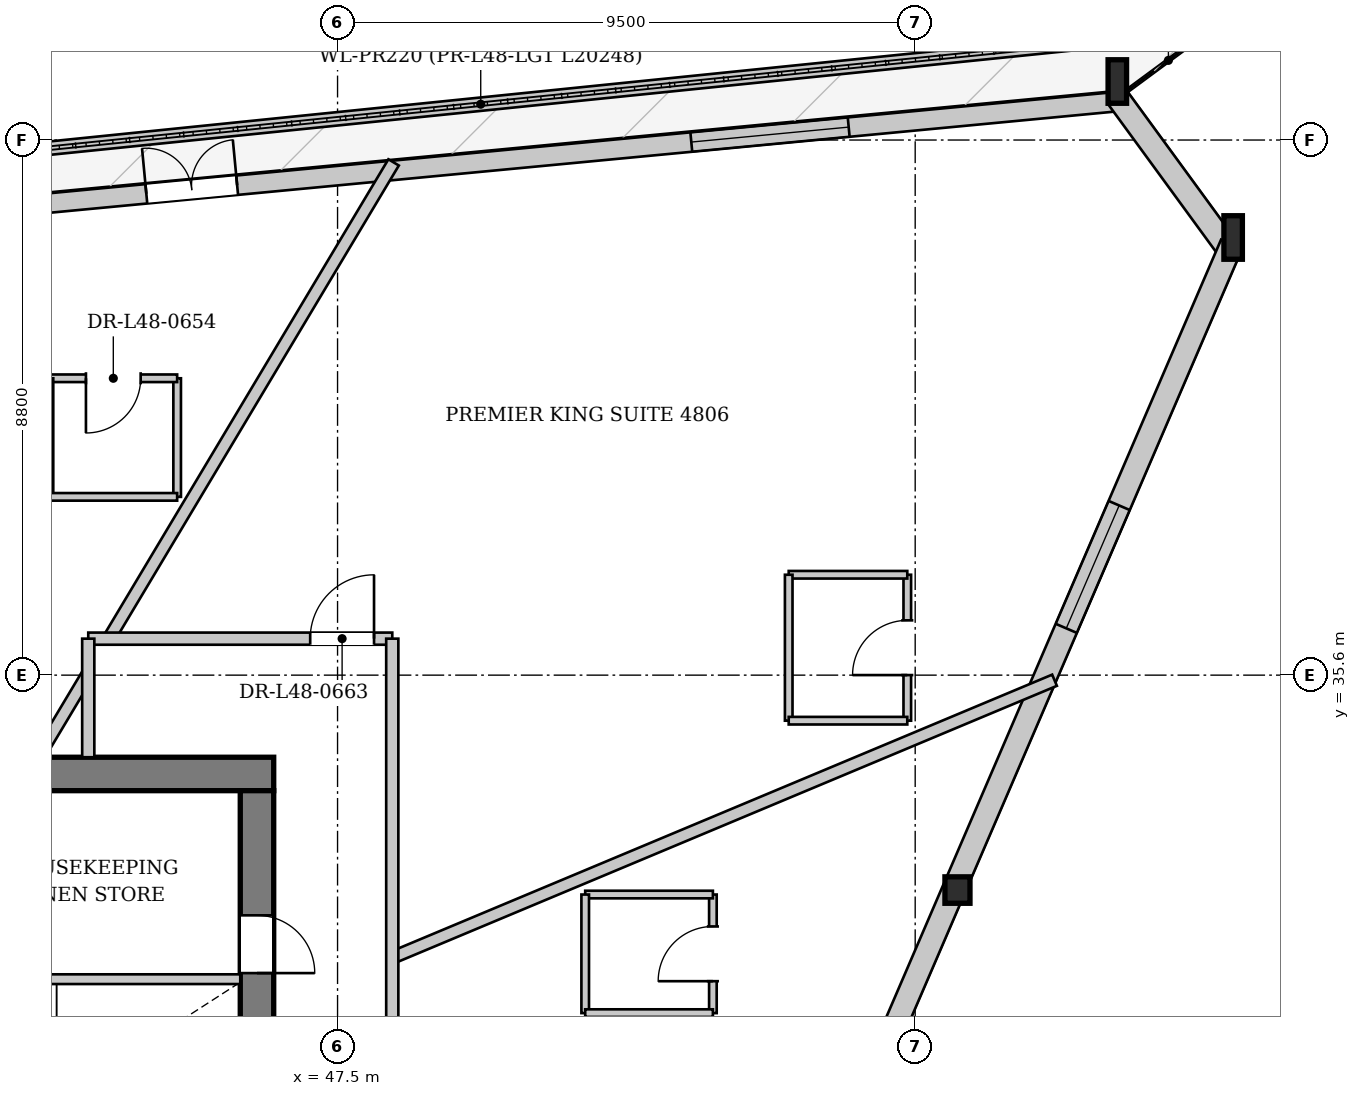
"""IFC4 building model, lengths in metres.
Left out: names, types, materials, properties, quantities, classifications, styles, units other than length and angle.
Written with IfcOpenShell. Run it as: python <this file> out.ifc"""

import sys

from ifc_helpers import new_model, si_unit, direction, frame, frame_2d, origin, origin_2d, place, context, subcontext, project, spatial, rectangle, i_section, extrude, source, transform, mapped, element, fill, save


model = new_model("IFC4")
c1 = context("Model", 3, precision=1e-05, world=origin(), true_north=direction((0.0, 1.0)))
c2 = subcontext(c1, "Body", "Model", "MODEL_VIEW")
j1 = project(units=[si_unit("LENGTHUNIT", "METRE"), si_unit("PLANEANGLEUNIT", "RADIAN")], contexts=[c1])
p1 = place(None, origin())
s1 = spatial("IfcSite", under=j1, at=p1, CompositionType="ELEMENT")
p2 = place(p1, origin())
s2 = spatial("IfcBuilding", under=s1, at=p2, CompositionType="ELEMENT")
p3 = place(p2, frame((0.0, 0.0, 182.1)))
s3 = spatial("IfcBuildingStorey", under=s2, at=p3, CompositionType="ELEMENT", Elevation=182.1)
m1 = source(origin(), c2, "Body", "SweptSolid", [
    extrude(i_section(OverallWidth=0.304, OverallDepth=0.716, WebThickness=0.021, FlangeThickness=0.04, at=origin_2d()), origin(), (0.0, 0.0, 1.0), 3.418),
])
p4 = place(p3, frame((62.38, 42.613, 0.0), z_axis=(-0.08806071749, 0.108058285128, 0.990236697487), x_axis=(-0.775188521165, -0.631729971313, 0.0)))
e1 = element("IfcColumn", 1, at=p4, inside=s3, PredefinedType="COLUMN", context=c2, shape_type="MappedRepresentation", body=[
    mapped(m1, transform((0.0, 0.0, 0.0), x_axis=(1.0, 0.0, 0.0), y_axis=(0.0, 1.0, 0.0), z_axis=(0.0, 0.0, 1.0), scale=1.0)),
])
m2 = source(origin(), c2, "Body", "SweptSolid", [
    extrude(i_section(OverallWidth=0.304, OverallDepth=0.716, WebThickness=0.021, FlangeThickness=0.04, at=origin_2d()), origin(), (0.0, 0.0, 1.0), 3.414),
])
p5 = place(p3, frame((60.484, 45.208, 0.0), z_axis=(-0.093253223651, 0.090392695318, 0.99153063337), x_axis=(-0.696008228581, -0.718033805435, 0.0)))
e2 = element("IfcColumn", 2, at=p5, inside=s3, PredefinedType="COLUMN", context=c2, shape_type="MappedRepresentation", body=[
    mapped(m2, transform((0.0, 0.0, 0.0), x_axis=(1.0, 0.0, 0.0), y_axis=(0.0, 1.0, 0.0), z_axis=(0.0, 0.0, 1.0), scale=1.0)),
])
m3 = source(origin(), c2, "Body", "SweptSolid", [
    extrude(i_section(OverallWidth=0.412, OverallDepth=0.435, WebThickness=0.031, FlangeThickness=0.05, at=origin_2d()), origin(), (0.0, 0.0, 1.0), 3.404),
])
p6 = place(p3, frame((57.769, 31.905, 0.0), z_axis=(-0.043541791354, 0.094472058012, 0.994574855232), x_axis=(-0.908181269279, -0.418577092219, 0.0)))
e3 = element("IfcColumn", 3, at=p6, inside=s3, PredefinedType="COLUMN", context=c2, shape_type="MappedRepresentation", body=[
    mapped(m3, transform((0.0, 0.0, 0.0), x_axis=(1.0, 0.0, 0.0), y_axis=(0.0, 1.0, 0.0), z_axis=(0.0, 0.0, 1.0), scale=1.0)),
])
p7 = place(p3, frame((37.857, 42.898, 0.0), z_axis=(0.0, 0.0, 1.0), x_axis=(0.995520332202, 0.094547703155, 0.0)))
e4 = element("IfcWall", 4, at=p7, inside=s3, PredefinedType="SOLIDWALL", context=c2, shape_type="SweptSolid", body=[
    extrude(rectangle(XDim=22.744, YDim=0.32, at=frame_2d((11.372, 0.0))), origin(), (0.0, 0.0, 1.0), 2.722),
])
p8 = place(p7, frame((6.528, 0.0, 0.0)))
e5 = element("IfcOpeningElement", 5, at=p8, cuts=e4, PredefinedType="OPENING", context=c2, shape_type="SweptSolid", body=[
    extrude(rectangle(XDim=1.5, YDim=2.3, at=frame_2d((0.75, 1.15))), frame((0.0, 0.17, 0.0), z_axis=(0.0, -1.0, 0.0), x_axis=(1.0, 0.0, 0.0)), (0.0, 0.0, 1.0), 0.34),
])
p9 = place(p7, frame((15.531, 0.0, 0.252)))
e6 = element("IfcOpeningElement", 6, at=p9, cuts=e4, PredefinedType="OPENING", context=c2, shape_type="SweptSolid", body=[
    extrude(rectangle(XDim=2.6, YDim=2.35, at=frame_2d((1.3, 1.175))), frame((0.0, 0.17, 0.0), z_axis=(0.0, -1.0, 0.0), x_axis=(1.0, 0.0, 0.0)), (0.0, 0.0, 1.0), 0.34),
])
p10 = place(p3, frame((60.33, 45.096, 0.0), z_axis=(0.0, 0.0, 1.0), x_axis=(0.589877559106, -0.807492702917, 0.0)))
e7 = element("IfcWall", 7, at=p10, inside=s3, PredefinedType="SOLIDWALL", context=c2, shape_type="SweptSolid", body=[
    extrude(rectangle(XDim=3.214, YDim=0.38, at=frame_2d((1.607, 0.0))), origin(), (0.0, 0.0, 1.0), 2.722),
])
p11 = place(p3, frame((62.205, 42.688, 0.0), z_axis=(0.0, 0.0, 1.0), x_axis=(-0.395471845497, -0.918478099586, 0.0)))
e8 = element("IfcWall", 8, at=p11, inside=s3, PredefinedType="SOLIDWALL", context=c2, shape_type="SweptSolid", body=[
    extrude(rectangle(XDim=23.316, YDim=0.38, at=frame_2d((11.658, 0.0))), origin(), (0.0, 0.0, 1.0), 2.722),
])
p12 = place(p11, frame((4.679, 0.0, 0.352)))
e9 = element("IfcOpeningElement", 9, at=p12, cuts=e8, PredefinedType="OPENING", context=c2, shape_type="SweptSolid", body=[
    extrude(rectangle(XDim=2.2, YDim=2.25, at=frame_2d((1.1, 1.125))), frame((0.0, 0.2, 0.0), z_axis=(0.0, -1.0, 0.0), x_axis=(1.0, 0.0, 0.0)), (0.0, 0.0, 1.0), 0.4),
])
p13 = place(p11, frame((15.688, 0.0, 0.352)))
e10 = element("IfcOpeningElement", 10, at=p13, cuts=e8, PredefinedType="OPENING", context=c2, shape_type="SweptSolid", body=[
    extrude(rectangle(XDim=2.2, YDim=2.25, at=frame_2d((1.1, 1.125))), frame((0.0, 0.2, 0.0), z_axis=(0.0, -1.0, 0.0), x_axis=(1.0, 0.0, 0.0)), (0.0, 0.0, 1.0), 0.4),
])
p14 = place(p3, frame((59.927, 46.017, 0.0), z_axis=(0.0, 0.0, 1.0), x_axis=(-0.994838142645, -0.101474479251, 0.0)))
e11 = element("IfcWall", 11, at=p14, inside=s3, PredefinedType="PARAPET", context=c2, shape_type="SweptSolid", body=[
    extrude(rectangle(XDim=20.248, YDim=0.22, at=frame_2d((10.124, 0.0))), origin(), (0.0, 0.0, 1.0), 0.3),
])
p15 = place(p3, frame((29.55, 33.975, 0.0), z_axis=(0.0, 0.0, 1.0), x_axis=(1.0, 0.0, 0.0)))
e12 = element("IfcWall", 12, at=p15, inside=s3, PredefinedType="SHEAR", context=c2, shape_type="SweptSolid", body=[
    extrude(rectangle(XDim=16.9, YDim=0.55, at=frame_2d((8.45, 0.0))), origin(), (0.0, 0.0, 1.0), 3.33),
])
p16 = place(p15, frame((1.55, 0.0, 0.0)))
e13 = element("IfcOpeningElement", 13, at=p16, cuts=e12, PredefinedType="OPENING", context=c2, shape_type="SweptSolid", body=[
    extrude(rectangle(XDim=0.95, YDim=2.1, at=frame_2d((0.475, 1.05))), frame((0.0, 0.285, 0.0), z_axis=(0.0, -1.0, 0.0), x_axis=(1.0, 0.0, 0.0)), (0.0, 0.0, 1.0), 0.57),
])
p17 = place(p15, frame((3.93, 0.0, 0.0)))
e14 = element("IfcOpeningElement", 14, at=p17, cuts=e12, PredefinedType="OPENING", context=c2, shape_type="SweptSolid", body=[
    extrude(rectangle(XDim=1.32, YDim=2.2, at=frame_2d((0.66, 1.1))), frame((0.0, 0.285, 0.0), z_axis=(0.0, -1.0, 0.0), x_axis=(1.0, 0.0, 0.0)), (0.0, 0.0, 1.0), 0.57),
])
p18 = place(p3, frame((46.175, 33.7, 0.0), z_axis=(0.0, 0.0, 1.0), x_axis=(0.0, -1.0, 0.0)))
e15 = element("IfcWall", 15, at=p18, inside=s3, PredefinedType="SHEAR", context=c2, shape_type="SweptSolid", body=[
    extrude(rectangle(XDim=14.2, YDim=0.55, at=frame_2d((7.1, 0.0))), origin(), (0.0, 0.0, 1.0), 3.33),
])
p19 = place(p18, frame((5.18, 0.0, 0.0)))
e16 = element("IfcOpeningElement", 16, at=p19, cuts=e15, PredefinedType="OPENING", context=c2, shape_type="SweptSolid", body=[
    extrude(rectangle(XDim=1.6, YDim=2.2, at=frame_2d((0.8, 1.1))), frame((0.0, 0.285, 0.0), z_axis=(0.0, -1.0, 0.0), x_axis=(1.0, 0.0, 0.0)), (0.0, 0.0, 1.0), 0.57),
])
p20 = place(p18, frame((2.05, 0.0, 0.0)))
e17 = element("IfcOpeningElement", 17, at=p20, cuts=e15, PredefinedType="OPENING", context=c2, shape_type="SweptSolid", body=[
    extrude(rectangle(XDim=0.95, YDim=2.1, at=frame_2d((0.475, 1.05))), frame((0.0, 0.285, 0.0), z_axis=(0.0, -1.0, 0.0), x_axis=(1.0, 0.0, 0.0)), (0.0, 0.0, 1.0), 0.57),
])
p21 = place(p3, frame((40.72, 30.6, 0.0), z_axis=(0.0, 0.0, 1.0), x_axis=(1.0, 0.0, 0.0)))
e18 = element("IfcWall", 18, at=p21, inside=s3, PredefinedType="PARTITIONING", context=c2, shape_type="SweptSolid", body=[
    extrude(rectangle(XDim=5.18, YDim=0.16, at=frame_2d((2.59, 0.0))), origin(), (0.0, 0.0, 1.0), 3.33),
])
p22 = place(p3, frame((48.4, 30.955, 0.0), z_axis=(0.0, 0.0, 1.0), x_axis=(0.922383605096, 0.386275141641, 0.0)))
e19 = element("IfcWall", 19, at=p22, inside=s3, PredefinedType="PARTITIONING", context=c2, shape_type="SweptSolid", body=[
    extrude(rectangle(XDim=11.808, YDim=0.2, at=frame_2d((5.904, 0.0))), origin(), (0.0, 0.0, 1.0), 3.33),
])
p23 = place(p3, frame((42.573, 34.25, 0.0), z_axis=(0.0, 0.0, 1.0), x_axis=(0.513135248782, 0.858307763251, 0.0)))
e20 = element("IfcWall", 20, at=p23, inside=s3, PredefinedType="PARTITIONING", context=c2, shape_type="SweptSolid", body=[
    extrude(rectangle(XDim=1.611, YDim=0.2, at=frame_2d((0.805, 0.0))), origin(), (0.0, 0.0, 1.0), 3.33),
])
p24 = place(p3, frame((43.739, 36.2, 0.0), z_axis=(0.0, 0.0, 1.0), x_axis=(0.51314560482, 0.858301571858, 0.0)))
e21 = element("IfcWall", 21, at=p24, inside=s3, PredefinedType="PARTITIONING", context=c2, shape_type="SweptSolid", body=[
    extrude(rectangle(XDim=9.125, YDim=0.2, at=frame_2d((4.562, 0.0))), origin(), (0.0, 0.0, 1.0), 3.33),
])
p25 = place(p3, frame((53.673, 30.042, 0.0), z_axis=(0.0, 0.0, 1.0), x_axis=(0.0, 1.0, 0.0)))
e22 = element("IfcWall", 22, at=p25, inside=s3, PredefinedType="PARTITIONING", context=c2, shape_type="SweptSolid", body=[
    extrude(rectangle(XDim=1.95, YDim=0.125, at=frame_2d((0.975, 0.0))), origin(), (0.0, 0.0, 1.0), 3.33),
])
p26 = place(p25, frame((0.525, 0.0, 0.0)))
e23 = element("IfcOpeningElement", 23, at=p26, cuts=e22, PredefinedType="OPENING", context=c2, shape_type="SweptSolid", body=[
    extrude(rectangle(XDim=0.9, YDim=2.1, at=frame_2d((0.45, 1.05))), frame((0.0, 0.073, 0.0), z_axis=(0.0, -1.0, 0.0), x_axis=(1.0, 0.0, 0.0)), (0.0, 0.0, 1.0), 0.145),
])
p27 = place(p3, frame((53.673, 31.992, 0.0), z_axis=(0.0, 0.0, 1.0), x_axis=(-1.0, 0.0, 0.0)))
e24 = element("IfcWall", 24, at=p27, inside=s3, PredefinedType="PARTITIONING", context=c2, shape_type="SweptSolid", body=[
    extrude(rectangle(XDim=2.1, YDim=0.125, at=frame_2d((1.05, 0.0))), origin(), (0.0, 0.0, 1.0), 3.33),
])
p28 = place(p3, frame((51.573, 31.992, 0.0), z_axis=(0.0, 0.0, 1.0), x_axis=(0.0, -1.0, 0.0)))
e25 = element("IfcWall", 25, at=p28, inside=s3, PredefinedType="PARTITIONING", context=c2, shape_type="SweptSolid", body=[
    extrude(rectangle(XDim=1.95, YDim=0.125, at=frame_2d((0.975, 0.0))), origin(), (0.0, 0.0, 1.0), 3.33),
])
p29 = place(p3, frame((51.573, 30.042, 0.0), z_axis=(0.0, 0.0, 1.0), x_axis=(1.0, 0.0, 0.0)))
e26 = element("IfcWall", 26, at=p29, inside=s3, PredefinedType="PARTITIONING", context=c2, shape_type="SweptSolid", body=[
    extrude(rectangle(XDim=2.1, YDim=0.125, at=frame_2d((1.05, 0.0))), origin(), (0.0, 0.0, 1.0), 3.33),
])
p30 = place(p3, frame((56.87, 34.851, 0.0), z_axis=(0.0, 0.0, 1.0), x_axis=(0.0, 1.0, 0.0)))
e27 = element("IfcWall", 27, at=p30, inside=s3, PredefinedType="PARTITIONING", context=c2, shape_type="SweptSolid", body=[
    extrude(rectangle(XDim=2.4, YDim=0.125, at=frame_2d((1.2, 0.0))), origin(), (0.0, 0.0, 1.0), 3.33),
])
p31 = place(p30, frame((0.75, 0.0, 0.0)))
e28 = element("IfcOpeningElement", 28, at=p31, cuts=e27, PredefinedType="OPENING", context=c2, shape_type="SweptSolid", body=[
    extrude(rectangle(XDim=0.9, YDim=2.1, at=frame_2d((0.45, 1.05))), frame((0.0, 0.073, 0.0), z_axis=(0.0, -1.0, 0.0), x_axis=(1.0, 0.0, 0.0)), (0.0, 0.0, 1.0), 0.145),
])
p32 = place(p3, frame((56.87, 37.251, 0.0), z_axis=(0.0, 0.0, 1.0), x_axis=(-1.0, 0.0, 0.0)))
e29 = element("IfcWall", 29, at=p32, inside=s3, PredefinedType="PARTITIONING", context=c2, shape_type="SweptSolid", body=[
    extrude(rectangle(XDim=1.95, YDim=0.125, at=frame_2d((0.975, 0.0))), origin(), (0.0, 0.0, 1.0), 3.33),
])
p33 = place(p3, frame((54.92, 37.251, 0.0), z_axis=(0.0, 0.0, 1.0), x_axis=(0.0, -1.0, 0.0)))
e30 = element("IfcWall", 30, at=p33, inside=s3, PredefinedType="PARTITIONING", context=c2, shape_type="SweptSolid", body=[
    extrude(rectangle(XDim=2.4, YDim=0.125, at=frame_2d((1.2, 0.0))), origin(), (0.0, 0.0, 1.0), 3.33),
])
p34 = place(p3, frame((54.92, 34.851, 0.0), z_axis=(0.0, 0.0, 1.0), x_axis=(1.0, 0.0, 0.0)))
e31 = element("IfcWall", 31, at=p34, inside=s3, PredefinedType="PARTITIONING", context=c2, shape_type="SweptSolid", body=[
    extrude(rectangle(XDim=1.95, YDim=0.125, at=frame_2d((0.975, 0.0))), origin(), (0.0, 0.0, 1.0), 3.33),
])
p35 = place(p3, frame((44.862, 38.532, 0.0), z_axis=(0.0, 0.0, 1.0), x_axis=(0.0, 1.0, 0.0)))
e32 = element("IfcWall", 32, at=p35, inside=s3, PredefinedType="PARTITIONING", context=c2, shape_type="SweptSolid", body=[
    extrude(rectangle(XDim=1.95, YDim=0.125, at=frame_2d((0.975, 0.0))), origin(), (0.0, 0.0, 1.0), 3.33),
])
p36 = place(p3, frame((44.862, 40.482, 0.0), z_axis=(0.0, 0.0, 1.0), x_axis=(-1.0, 0.0, 0.0)))
e33 = element("IfcWall", 33, at=p36, inside=s3, PredefinedType="PARTITIONING", context=c2, shape_type="SweptSolid", body=[
    extrude(rectangle(XDim=2.1, YDim=0.125, at=frame_2d((1.05, 0.0))), origin(), (0.0, 0.0, 1.0), 3.33),
])
p37 = place(p36, frame((0.6, 0.0, 0.0)))
e34 = element("IfcOpeningElement", 34, at=p37, cuts=e33, PredefinedType="OPENING", context=c2, shape_type="SweptSolid", body=[
    extrude(rectangle(XDim=0.9, YDim=2.1, at=frame_2d((0.45, 1.05))), frame((0.0, 0.073, 0.0), z_axis=(0.0, -1.0, 0.0), x_axis=(1.0, 0.0, 0.0)), (0.0, 0.0, 1.0), 0.145),
])
p38 = place(p3, frame((42.762, 40.482, 0.0), z_axis=(0.0, 0.0, 1.0), x_axis=(0.0, -1.0, 0.0)))
e35 = element("IfcWall", 35, at=p38, inside=s3, PredefinedType="PARTITIONING", context=c2, shape_type="SweptSolid", body=[
    extrude(rectangle(XDim=1.95, YDim=0.125, at=frame_2d((0.975, 0.0))), origin(), (0.0, 0.0, 1.0), 3.33),
])
p39 = place(p3, frame((42.762, 38.532, 0.0), z_axis=(0.0, 0.0, 1.0), x_axis=(1.0, 0.0, 0.0)))
e36 = element("IfcWall", 36, at=p39, inside=s3, PredefinedType="PARTITIONING", context=c2, shape_type="SweptSolid", body=[
    extrude(rectangle(XDim=2.1, YDim=0.125, at=frame_2d((1.05, 0.0))), origin(), (0.0, 0.0, 1.0), 3.33),
])
p40 = place(p3, frame((43.4, 36.2, 0.0), z_axis=(0.0, 0.0, 1.0), x_axis=(1.0, 0.0, 0.0)))
e37 = element("IfcWall", 37, at=p40, inside=s3, PredefinedType="PARTITIONING", context=c2, shape_type="SweptSolid", body=[
    extrude(rectangle(XDim=5.0, YDim=0.2, at=frame_2d((2.5, 0.0))), origin(), (0.0, 0.0, 1.0), 3.33),
])
p41 = place(p40, frame((3.65, 0.0, 0.0)))
e38 = element("IfcOpeningElement", 38, at=p41, cuts=e37, PredefinedType="OPENING", context=c2, shape_type="SweptSolid", body=[
    extrude(rectangle(XDim=1.05, YDim=2.2, at=frame_2d((0.525, 1.1))), frame((0.0, 0.11, 0.0), z_axis=(0.0, -1.0, 0.0), x_axis=(1.0, 0.0, 0.0)), (0.0, 0.0, 1.0), 0.22),
])
p42 = place(p3, frame((43.4, 34.25, 0.0), z_axis=(0.0, 0.0, 1.0), x_axis=(0.0, 1.0, 0.0)))
e39 = element("IfcWall", 39, at=p42, inside=s3, PredefinedType="PARTITIONING", context=c2, shape_type="SweptSolid", body=[
    extrude(rectangle(XDim=1.95, YDim=0.2, at=frame_2d((0.975, 0.0))), origin(), (0.0, 0.0, 1.0), 3.33),
])
p43 = place(p3, frame((48.4, 17.0, 0.0), z_axis=(0.0, 0.0, 1.0), x_axis=(0.0, 1.0, 0.0)))
e40 = element("IfcWall", 40, at=p43, inside=s3, PredefinedType="PARTITIONING", context=c2, shape_type="SweptSolid", body=[
    extrude(rectangle(XDim=19.2, YDim=0.2, at=frame_2d((9.6, 0.0))), origin(), (0.0, 0.0, 1.0), 3.33),
])
p44 = place(p43, frame((9.478, 0.0, 0.0)))
e41 = element("IfcOpeningElement", 41, at=p44, cuts=e40, PredefinedType="OPENING", context=c2, shape_type="SweptSolid", body=[
    extrude(rectangle(XDim=1.05, YDim=2.2, at=frame_2d((0.525, 1.1))), frame((0.0, 0.11, 0.0), z_axis=(0.0, -1.0, 0.0), x_axis=(1.0, 0.0, 0.0)), (0.0, 0.0, 1.0), 0.22),
])
m4 = source(origin(), c2, "Body", "SweptSolid", [
    extrude(rectangle(XDim=1.5, YDim=2.3, at=frame_2d((0.75, 1.15))), frame((0.0, 0.025, 0.0), z_axis=(0.0, -1.0, 0.0), x_axis=(1.0, 0.0, 0.0)), (0.0, 0.0, 1.0), 0.05),
])
p45 = place(p8, origin())
e42 = element("IfcDoor", 42, at=p45, inside=s3, OperationType="DOUBLE_DOOR_SINGLE_SWING", PredefinedType="DOOR", context=c2, shape_type="MappedRepresentation", body=[
    mapped(m4, transform((0.0, 0.0, 0.0), x_axis=(1.0, 0.0, 0.0), y_axis=(0.0, 1.0, 0.0), z_axis=(0.0, 0.0, 1.0), scale=1.0)),
])
fill(e5, e42)
m5 = source(origin(), c2, "Body", "SweptSolid", [
    extrude(rectangle(XDim=2.6, YDim=2.35, at=frame_2d((1.3, 1.175))), frame((0.0, 0.03, 0.0), z_axis=(0.0, -1.0, 0.0), x_axis=(1.0, 0.0, 0.0)), (0.0, 0.0, 1.0), 0.06),
])
p46 = place(p9, origin())
e43 = element("IfcWindow", 43, at=p46, inside=s3, PartitioningType="SINGLE_PANEL", PredefinedType="WINDOW", context=c2, shape_type="MappedRepresentation", body=[
    mapped(m5, transform((0.0, 0.0, 0.0), x_axis=(1.0, 0.0, 0.0), y_axis=(0.0, 1.0, 0.0), z_axis=(0.0, 0.0, 1.0), scale=1.0)),
])
fill(e6, e43)
m6 = source(origin(), c2, "Body", "SweptSolid", [
    extrude(rectangle(XDim=2.2, YDim=2.25, at=frame_2d((1.1, 1.125))), frame((0.0, 0.03, 0.0), z_axis=(0.0, -1.0, 0.0), x_axis=(1.0, 0.0, 0.0)), (0.0, 0.0, 1.0), 0.06),
])
p47 = place(p12, origin())
e44 = element("IfcWindow", 44, at=p47, inside=s3, PartitioningType="SINGLE_PANEL", PredefinedType="WINDOW", context=c2, shape_type="MappedRepresentation", body=[
    mapped(m6, transform((0.0, 0.0, 0.0), x_axis=(1.0, 0.0, 0.0), y_axis=(0.0, 1.0, 0.0), z_axis=(0.0, 0.0, 1.0), scale=1.0)),
])
fill(e9, e44)
m7 = source(origin(), c2, "Body", "SweptSolid", [
    extrude(rectangle(XDim=0.95, YDim=2.1, at=frame_2d((0.475, 1.05))), frame((0.0, 0.025, 0.0), z_axis=(0.0, -1.0, 0.0), x_axis=(1.0, 0.0, 0.0)), (0.0, 0.0, 1.0), 0.05),
])
p48 = place(p20, origin())
e45 = element("IfcDoor", 45, at=p48, inside=s3, OperationType="SINGLE_SWING_RIGHT", PredefinedType="DOOR", context=c2, shape_type="MappedRepresentation", body=[
    mapped(m7, transform((0.0, 0.0, 0.0), x_axis=(1.0, 0.0, 0.0), y_axis=(0.0, 1.0, 0.0), z_axis=(0.0, 0.0, 1.0), scale=1.0)),
])
fill(e17, e45)
m8 = source(origin(), c2, "Body", "SweptSolid", [
    extrude(rectangle(XDim=0.9, YDim=2.1, at=frame_2d((0.45, 1.05))), frame((0.0, 0.025, 0.0), z_axis=(0.0, -1.0, 0.0), x_axis=(1.0, 0.0, 0.0)), (0.0, 0.0, 1.0), 0.05),
])
p49 = place(p26, origin())
e46 = element("IfcDoor", 46, at=p49, inside=s3, OperationType="SINGLE_SWING_LEFT", PredefinedType="DOOR", context=c2, shape_type="MappedRepresentation", body=[
    mapped(m8, transform((0.0, 0.0, 0.0), x_axis=(1.0, 0.0, 0.0), y_axis=(0.0, 1.0, 0.0), z_axis=(0.0, 0.0, 1.0), scale=1.0)),
])
fill(e23, e46)
p50 = place(p31, origin())
e47 = element("IfcDoor", 47, at=p50, inside=s3, OperationType="SINGLE_SWING_LEFT", PredefinedType="DOOR", context=c2, shape_type="MappedRepresentation", body=[
    mapped(m8, transform((0.0, 0.0, 0.0), x_axis=(1.0, 0.0, 0.0), y_axis=(0.0, 1.0, 0.0), z_axis=(0.0, 0.0, 1.0), scale=1.0)),
])
fill(e28, e47)
p51 = place(p37, origin())
e48 = element("IfcDoor", 48, at=p51, inside=s3, OperationType="SINGLE_SWING_RIGHT", PredefinedType="DOOR", context=c2, shape_type="MappedRepresentation", body=[
    mapped(m8, transform((0.0, 0.0, 0.0), x_axis=(1.0, 0.0, 0.0), y_axis=(0.0, 1.0, 0.0), z_axis=(0.0, 0.0, 1.0), scale=1.0)),
])
fill(e34, e48)
m9 = source(origin(), c2, "Body", "SweptSolid", [
    extrude(rectangle(XDim=1.05, YDim=2.2, at=frame_2d((0.525, 1.1))), frame((0.0, 0.025, 0.0), z_axis=(0.0, -1.0, 0.0), x_axis=(1.0, 0.0, 0.0)), (0.0, 0.0, 1.0), 0.05),
])
p52 = place(p41, origin())
e49 = element("IfcDoor", 49, at=p52, inside=s3, OperationType="SINGLE_SWING_RIGHT", PredefinedType="DOOR", context=c2, shape_type="MappedRepresentation", body=[
    mapped(m9, transform((0.0, 0.0, 0.0), x_axis=(1.0, 0.0, 0.0), y_axis=(0.0, 1.0, 0.0), z_axis=(0.0, 0.0, 1.0), scale=1.0)),
])
fill(e38, e49)
save(model, sys.argv[1])
